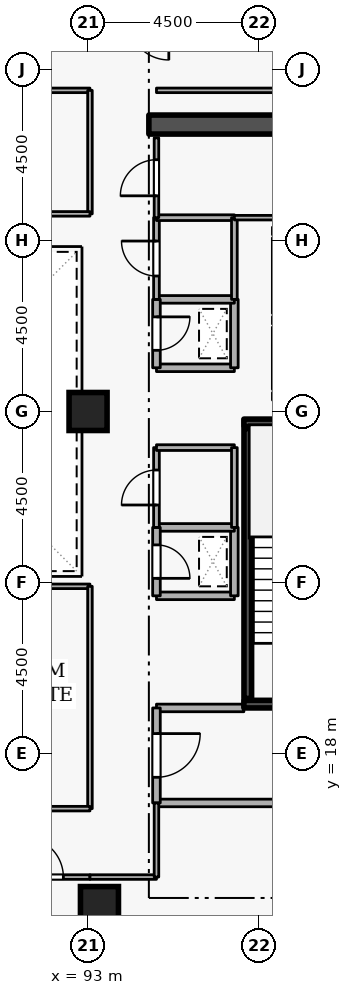
"""IFC4 building model, lengths in metres.
Left out: names, types, materials, properties, quantities, classifications, styles, units other than length and angle.
Written with IfcOpenShell. Run it as: python <this file> out.ifc"""

import sys

from ifc_helpers import new_model, si_unit, direction, frame, frame_2d, origin, origin_2d, place, context, subcontext, project, spatial, rectangle, extrude, element, fill, save


model = new_model("IFC4")
c1 = context("Model", 3, precision=1e-05, world=origin(), true_north=direction((0.0, 1.0)))
c2 = subcontext(c1, "Body", "Model", "MODEL_VIEW")
j1 = project(units=[si_unit("LENGTHUNIT", "METRE"), si_unit("PLANEANGLEUNIT", "RADIAN")], contexts=[c1])
p1 = place(None, origin())
s1 = spatial("IfcSite", under=j1, at=p1, CompositionType="ELEMENT")
p2 = place(p1, origin())
s2 = spatial("IfcBuilding", under=s1, at=p2, CompositionType="ELEMENT")
p3 = place(p2, frame((0.0, 0.0, 229.5)))
s3 = spatial("IfcBuildingStorey", under=s2, at=p3, CompositionType="ELEMENT", Elevation=229.5)
p4 = place(p3, frame((94.6, 34.55, 0.0), z_axis=(0.0, 0.0, 1.0), x_axis=(1.0, 0.0, 0.0)))
e1 = element("IfcWall", 1, at=p4, inside=s3, PredefinedType="SHEAR", context=c2, shape_type="SweptSolid", body=[
    extrude(rectangle(XDim=5.8, YDim=0.5, at=frame_2d((2.9, 0.0))), origin(), (0.0, 0.0, 1.0), 3.6),
])
for number, where, z_axis, x_axis in (
    (2, (93.3, 14.0, 0.0), (0.0, 0.0, 1.0), (1.0, 0.0, 0.0)),
    (3, (93.0, 27.0, 0.0), (0.0, 0.0, 1.0), (1.0, 0.0, 0.0)),
):
    element("IfcColumn", number, at=place(p3, frame(where, z_axis=z_axis, x_axis=x_axis)), inside=s3, PredefinedType="COLUMN", context=c2, shape_type="SweptSolid", body=[
        extrude(rectangle(XDim=1.0, YDim=1.0, at=origin_2d()), origin(), (0.0, 0.0, 1.0), 3.6),
    ])
p5 = place(p3, frame((97.95, 29.22, 0.0), z_axis=(0.0, 0.0, 1.0), x_axis=(0.0, -1.0, 0.0)))
e4 = element("IfcWall", 4, at=p5, inside=s3, PredefinedType="STANDARD", context=c2, shape_type="SweptSolid", body=[
    extrude(rectangle(XDim=1.64, YDim=0.2, at=frame_2d((0.82, 0.0))), origin(), (0.0, 0.0, 1.0), 3.3),
])
p6 = place(p5, frame((0.31, 0.0, 0.0)))
e5 = element("IfcOpeningElement", 5, at=p6, cuts=e4, PredefinedType="OPENING", context=c2, shape_type="SweptSolid", body=[
    extrude(rectangle(XDim=1.02, YDim=2.06, at=frame_2d((0.51, 1.03))), frame((0.0, 0.11, 0.0), z_axis=(0.0, -1.0, 0.0), x_axis=(1.0, 0.0, 0.0)), (0.0, 0.0, 1.0), 0.22),
])
p7 = place(p3, frame((97.95, 31.57, 0.0), z_axis=(0.0, 0.0, 1.0), x_axis=(0.0, -1.0, 0.0)))
e6 = element("IfcWall", 6, at=p7, inside=s3, PredefinedType="STANDARD", context=c2, shape_type="SweptSolid", body=[
    extrude(rectangle(XDim=1.99, YDim=0.2, at=frame_2d((0.995, 0.0))), origin(), (0.0, 0.0, 1.0), 3.3),
])
p8 = place(p7, frame((0.485, 0.0, 0.0)))
e7 = element("IfcOpeningElement", 7, at=p8, cuts=e6, PredefinedType="OPENING", context=c2, shape_type="SweptSolid", body=[
    extrude(rectangle(XDim=1.02, YDim=2.06, at=frame_2d((0.51, 1.03))), frame((0.0, 0.11, 0.0), z_axis=(0.0, -1.0, 0.0), x_axis=(1.0, 0.0, 0.0)), (0.0, 0.0, 1.0), 0.22),
])
p9 = place(p3, frame((100.45, 19.3, 0.0), z_axis=(0.0, 0.0, 1.0), x_axis=(-1.0, 0.0, 0.0)))
e8 = element("IfcWall", 8, at=p9, inside=s3, PredefinedType="SHEAR", context=c2, shape_type="SweptSolid", body=[
    extrude(rectangle(XDim=3.35, YDim=0.2, at=frame_2d((1.675, 0.0))), origin(), (0.0, 0.0, 1.0), 3.6),
])
p10 = place(p9, frame((1.125, 0.0, 0.0)))
e9 = element("IfcOpeningElement", 9, at=p10, cuts=e8, PredefinedType="OPENING", context=c2, shape_type="SweptSolid", body=[
    extrude(rectangle(XDim=1.1, YDim=2.1, at=frame_2d((0.55, 1.05))), frame((0.0, 0.11, 0.0), z_axis=(0.0, -1.0, 0.0), x_axis=(1.0, 0.0, 0.0)), (0.0, 0.0, 1.0), 0.22),
])
p11 = place(p3, frame((97.1, 26.7, 0.0), z_axis=(0.0, 0.0, 1.0), x_axis=(1.0, 0.0, 0.0)))
e10 = element("IfcWall", 10, at=p11, inside=s3, PredefinedType="SHEAR", context=c2, shape_type="SweptSolid", body=[
    extrude(rectangle(XDim=3.35, YDim=0.2, at=frame_2d((1.675, 0.0))), origin(), (0.0, 0.0, 1.0), 3.6),
])
p12 = place(p3, frame((97.203, 26.55, 0.0), z_axis=(0.0, 0.0, 1.0), x_axis=(0.0, -1.0, 0.0)))
e11 = element("IfcWall", 11, at=p12, inside=s3, PredefinedType="SHEAR", context=c2, shape_type="SweptSolid", body=[
    extrude(rectangle(XDim=7.1, YDim=0.2, at=frame_2d((3.55, 0.0))), origin(), (0.0, 0.0, 1.0), 3.6),
])
p13 = place(p3, frame((94.8, 16.7, 0.0), z_axis=(0.0, 0.0, 1.0), x_axis=(1.0, 0.0, 0.0)))
e12 = element("IfcWall", 12, at=p13, inside=s3, PredefinedType="STANDARD", context=c2, shape_type="SweptSolid", body=[
    extrude(rectangle(XDim=5.7, YDim=0.2, at=frame_2d((2.85, 0.0))), origin(), (0.0, 0.0, 1.0), 3.3),
])
p14 = place(p3, frame((97.1, 19.2, 0.0), z_axis=(0.0, 0.0, 1.0), x_axis=(-1.0, 0.0, 0.0)))
e13 = element("IfcWall", 13, at=p14, inside=s3, PredefinedType="STANDARD", context=c2, shape_type="SweptSolid", body=[
    extrude(rectangle(XDim=2.3, YDim=0.2, at=frame_2d((1.15, 0.0))), origin(), (0.0, 0.0, 1.0), 2.505),
])
p15 = place(p3, frame((94.8, 19.2, 0.0), z_axis=(0.0, 0.0, 1.0), x_axis=(0.0, -1.0, 0.0)))
e14 = element("IfcWall", 14, at=p15, inside=s3, PredefinedType="STANDARD", context=c2, shape_type="SweptSolid", body=[
    extrude(rectangle(XDim=2.5, YDim=0.2, at=frame_2d((1.25, 0.0))), origin(), (0.0, 0.0, 1.0), 3.3),
])
p16 = place(p15, frame((0.675, 0.0, 0.0)))
e15 = element("IfcOpeningElement", 15, at=p16, cuts=e14, PredefinedType="OPENING", context=c2, shape_type="SweptSolid", body=[
    extrude(rectangle(XDim=1.15, YDim=2.1, at=frame_2d((0.575, 1.05))), frame((0.0, 0.11, 0.0), z_axis=(0.0, -1.0, 0.0), x_axis=(1.0, 0.0, 0.0)), (0.0, 0.0, 1.0), 0.22),
])
p17 = place(p3, frame((94.8, 28.15, 0.0), z_axis=(0.0, 0.0, 1.0), x_axis=(1.0, 0.0, 0.0)))
e16 = element("IfcWall", 16, at=p17, inside=s3, PredefinedType="STANDARD", context=c2, shape_type="SweptSolid", body=[
    extrude(rectangle(XDim=2.05, YDim=0.2, at=frame_2d((1.025, 0.0))), origin(), (0.0, 0.0, 1.0), 3.3),
])
p18 = place(p3, frame((96.85, 28.15, 0.0), z_axis=(0.0, 0.0, 1.0), x_axis=(0.0, 1.0, 0.0)))
e17 = element("IfcWall", 17, at=p18, inside=s3, PredefinedType="STANDARD", context=c2, shape_type="SweptSolid", body=[
    extrude(rectangle(XDim=1.8, YDim=0.2, at=frame_2d((0.9, 0.0))), origin(), (0.0, 0.0, 1.0), 3.3),
])
p19 = place(p3, frame((96.85, 29.95, 0.0), z_axis=(0.0, 0.0, 1.0), x_axis=(-1.0, 0.0, 0.0)))
e18 = element("IfcWall", 18, at=p19, inside=s3, PredefinedType="STANDARD", context=c2, shape_type="SweptSolid", body=[
    extrude(rectangle(XDim=2.05, YDim=0.2, at=frame_2d((1.025, 0.0))), origin(), (0.0, 0.0, 1.0), 3.3),
])
p20 = place(p3, frame((94.8, 29.95, 0.0), z_axis=(0.0, 0.0, 1.0), x_axis=(0.0, -1.0, 0.0)))
e19 = element("IfcWall", 19, at=p20, inside=s3, PredefinedType="STANDARD", context=c2, shape_type="SweptSolid", body=[
    extrude(rectangle(XDim=1.8, YDim=0.2, at=frame_2d((0.9, 0.0))), origin(), (0.0, 0.0, 1.0), 3.3),
])
p21 = place(p20, frame((0.46, 0.0, 0.0)))
e20 = element("IfcOpeningElement", 20, at=p21, cuts=e19, PredefinedType="OPENING", context=c2, shape_type="SweptSolid", body=[
    extrude(rectangle(XDim=0.88, YDim=2.04, at=frame_2d((0.44, 1.02))), frame((0.0, 0.11, 0.0), z_axis=(0.0, -1.0, 0.0), x_axis=(1.0, 0.0, 0.0)), (0.0, 0.0, 1.0), 0.22),
])
p22 = place(p3, frame((94.8, 22.15, 0.0), z_axis=(0.0, 0.0, 1.0), x_axis=(1.0, 0.0, 0.0)))
e21 = element("IfcWall", 21, at=p22, inside=s3, PredefinedType="STANDARD", context=c2, shape_type="SweptSolid", body=[
    extrude(rectangle(XDim=2.05, YDim=0.2, at=frame_2d((1.025, 0.0))), origin(), (0.0, 0.0, 1.0), 3.3),
])
p23 = place(p3, frame((96.85, 22.15, 0.0), z_axis=(0.0, 0.0, 1.0), x_axis=(0.0, 1.0, 0.0)))
e22 = element("IfcWall", 22, at=p23, inside=s3, PredefinedType="STANDARD", context=c2, shape_type="SweptSolid", body=[
    extrude(rectangle(XDim=1.8, YDim=0.2, at=frame_2d((0.9, 0.0))), origin(), (0.0, 0.0, 1.0), 3.3),
])
p24 = place(p3, frame((96.85, 23.95, 0.0), z_axis=(0.0, 0.0, 1.0), x_axis=(-1.0, 0.0, 0.0)))
e23 = element("IfcWall", 23, at=p24, inside=s3, PredefinedType="STANDARD", context=c2, shape_type="SweptSolid", body=[
    extrude(rectangle(XDim=2.05, YDim=0.2, at=frame_2d((1.025, 0.0))), origin(), (0.0, 0.0, 1.0), 3.3),
])
p25 = place(p3, frame((94.8, 23.95, 0.0), z_axis=(0.0, 0.0, 1.0), x_axis=(0.0, -1.0, 0.0)))
e24 = element("IfcWall", 24, at=p25, inside=s3, PredefinedType="STANDARD", context=c2, shape_type="SweptSolid", body=[
    extrude(rectangle(XDim=1.8, YDim=0.2, at=frame_2d((0.9, 0.0))), origin(), (0.0, 0.0, 1.0), 3.3),
])
p26 = place(p25, frame((0.46, 0.0, 0.0)))
e25 = element("IfcOpeningElement", 25, at=p26, cuts=e24, PredefinedType="OPENING", context=c2, shape_type="SweptSolid", body=[
    extrude(rectangle(XDim=0.88, YDim=2.04, at=frame_2d((0.44, 1.02))), frame((0.0, 0.11, 0.0), z_axis=(0.0, -1.0, 0.0), x_axis=(1.0, 0.0, 0.0)), (0.0, 0.0, 1.0), 0.22),
])
p27 = place(p3, frame((94.8, 23.95, 0.0), z_axis=(0.0, 0.0, 1.0), x_axis=(0.0, 1.0, 0.0)))
e26 = element("IfcWall", 26, at=p27, inside=s3, PredefinedType="PARTITIONING", context=c2, shape_type="SweptSolid", body=[
    extrude(rectangle(XDim=2.1, YDim=0.15, at=frame_2d((1.05, 0.0))), origin(), (0.0, 0.0, 1.0), 3.3),
])
p28 = place(p27, frame((0.59, 0.0, 0.0)))
e27 = element("IfcOpeningElement", 27, at=p28, cuts=e26, PredefinedType="OPENING", context=c2, shape_type="SweptSolid", body=[
    extrude(rectangle(XDim=0.92, YDim=2.08, at=frame_2d((0.46, 1.04))), frame((0.0, 0.085, 0.0), z_axis=(0.0, -1.0, 0.0), x_axis=(1.0, 0.0, 0.0)), (0.0, 0.0, 1.0), 0.17),
])
p29 = place(p3, frame((94.8, 26.05, 0.0), z_axis=(0.0, 0.0, 1.0), x_axis=(1.0, 0.0, 0.0)))
e28 = element("IfcWall", 28, at=p29, inside=s3, PredefinedType="PARTITIONING", context=c2, shape_type="SweptSolid", body=[
    extrude(rectangle(XDim=2.05, YDim=0.15, at=frame_2d((1.025, 0.0))), origin(), (0.0, 0.0, 1.0), 3.3),
])
p30 = place(p3, frame((96.85, 26.05, 0.0), z_axis=(0.0, 0.0, 1.0), x_axis=(0.0, -1.0, 0.0)))
e29 = element("IfcWall", 29, at=p30, inside=s3, PredefinedType="PARTITIONING", context=c2, shape_type="SweptSolid", body=[
    extrude(rectangle(XDim=2.1, YDim=0.15, at=frame_2d((1.05, 0.0))), origin(), (0.0, 0.0, 1.0), 3.3),
])
p31 = place(p3, frame((94.8, 29.95, 0.0), z_axis=(0.0, 0.0, 1.0), x_axis=(0.0, 1.0, 0.0)))
e30 = element("IfcWall", 30, at=p31, inside=s3, PredefinedType="PARTITIONING", context=c2, shape_type="SweptSolid", body=[
    extrude(rectangle(XDim=2.15, YDim=0.15, at=frame_2d((1.075, 0.0))), origin(), (0.0, 0.0, 1.0), 3.3),
])
p32 = place(p31, frame((0.615, 0.0, 0.0)))
e31 = element("IfcOpeningElement", 31, at=p32, cuts=e30, PredefinedType="OPENING", context=c2, shape_type="SweptSolid", body=[
    extrude(rectangle(XDim=0.92, YDim=2.08, at=frame_2d((0.46, 1.04))), frame((0.0, 0.085, 0.0), z_axis=(0.0, -1.0, 0.0), x_axis=(1.0, 0.0, 0.0)), (0.0, 0.0, 1.0), 0.17),
])
p33 = place(p3, frame((94.8, 32.1, 0.0), z_axis=(0.0, 0.0, 1.0), x_axis=(1.0, 0.0, 0.0)))
e32 = element("IfcWall", 32, at=p33, inside=s3, PredefinedType="PARTITIONING", context=c2, shape_type="SweptSolid", body=[
    extrude(rectangle(XDim=2.05, YDim=0.15, at=frame_2d((1.025, 0.0))), origin(), (0.0, 0.0, 1.0), 3.3),
])
p34 = place(p3, frame((96.85, 32.1, 0.0), z_axis=(0.0, 0.0, 1.0), x_axis=(0.0, -1.0, 0.0)))
e33 = element("IfcWall", 33, at=p34, inside=s3, PredefinedType="PARTITIONING", context=c2, shape_type="SweptSolid", body=[
    extrude(rectangle(XDim=2.15, YDim=0.15, at=frame_2d((1.075, 0.0))), origin(), (0.0, 0.0, 1.0), 3.3),
])
p35 = place(p3, frame((94.8, 32.1, 0.0), z_axis=(0.0, 0.0, 1.0), x_axis=(0.0, 1.0, 0.0)))
e34 = element("IfcWall", 34, at=p35, inside=s3, PredefinedType="PARTITIONING", context=c2, shape_type="SweptSolid", body=[
    extrude(rectangle(XDim=2.1, YDim=0.12, at=frame_2d((1.05, 0.0))), origin(), (0.0, 0.0, 1.0), 3.3),
])
p36 = place(p35, frame((0.575, 0.0, 0.0)))
e35 = element("IfcOpeningElement", 35, at=p36, cuts=e34, PredefinedType="OPENING", context=c2, shape_type="SweptSolid", body=[
    extrude(rectangle(XDim=0.95, YDim=2.1, at=frame_2d((0.475, 1.05))), frame((0.0, 0.07, 0.0), z_axis=(0.0, -1.0, 0.0), x_axis=(1.0, 0.0, 0.0)), (0.0, 0.0, 1.0), 0.14),
])
p37 = place(p3, frame((100.4, 32.1, 0.0), z_axis=(0.0, 0.0, 1.0), x_axis=(-1.0, 0.0, 0.0)))
e36 = element("IfcWall", 36, at=p37, inside=s3, PredefinedType="PARTITIONING", context=c2, shape_type="SweptSolid", body=[
    extrude(rectangle(XDim=3.55, YDim=0.12, at=frame_2d((1.775, 0.0))), origin(), (0.0, 0.0, 1.0), 3.3),
])
p38 = place(p3, frame((94.8, 35.45, 0.0), z_axis=(0.0, 0.0, 1.0), x_axis=(1.0, 0.0, 0.0)))
e37 = element("IfcWall", 37, at=p38, inside=s3, PredefinedType="PARTITIONING", context=c2, shape_type="SweptSolid", body=[
    extrude(rectangle(XDim=5.9, YDim=0.12, at=frame_2d((2.95, 0.0))), origin(), (0.0, 0.0, 1.0), 3.3),
])
p39 = place(p3, frame((90.6, 14.75, 0.0), z_axis=(0.0, 0.0, 1.0), x_axis=(1.0, 0.0, 0.0)))
e38 = element("IfcWall", 38, at=p39, inside=s3, PredefinedType="PARTITIONING", context=c2, shape_type="SweptSolid", body=[
    extrude(rectangle(XDim=2.45, YDim=0.12, at=frame_2d((1.225, 0.0))), origin(), (0.0, 0.0, 1.0), 3.3),
])
p40 = place(p39, frame((0.7, 0.0, 0.0)))
e39 = element("IfcOpeningElement", 39, at=p40, cuts=e38, PredefinedType="OPENING", context=c2, shape_type="SweptSolid", body=[
    extrude(rectangle(XDim=1.05, YDim=2.1, at=frame_2d((0.525, 1.05))), frame((0.0, 0.07, 0.0), z_axis=(0.0, -1.0, 0.0), x_axis=(1.0, 0.0, 0.0)), (0.0, 0.0, 1.0), 0.14),
])
p41 = place(p3, frame((93.05, 14.75, 0.0), z_axis=(0.0, 0.0, 1.0), x_axis=(1.0, 0.0, 0.0)))
e40 = element("IfcWall", 40, at=p41, inside=s3, PredefinedType="PARTITIONING", context=c2, shape_type="SweptSolid", body=[
    extrude(rectangle(XDim=1.75, YDim=0.12, at=frame_2d((0.875, 0.0))), origin(), (0.0, 0.0, 1.0), 3.3),
])
p42 = place(p3, frame((94.8, 14.75, 0.0), z_axis=(0.0, 0.0, 1.0), x_axis=(0.0, 1.0, 0.0)))
e41 = element("IfcWall", 41, at=p42, inside=s3, PredefinedType="PARTITIONING", context=c2, shape_type="SweptSolid", body=[
    extrude(rectangle(XDim=1.95, YDim=0.12, at=frame_2d((0.975, 0.0))), origin(), (0.0, 0.0, 1.0), 3.3),
])
p43 = place(p3, frame((83.95, 22.4, 0.0), z_axis=(0.0, 0.0, 1.0), x_axis=(1.0, 0.0, 0.0)))
e42 = element("IfcWall", 42, at=p43, inside=s3, PredefinedType="PARTITIONING", context=c2, shape_type="SweptSolid", body=[
    extrude(rectangle(XDim=9.1, YDim=0.12, at=frame_2d((4.55, 0.0))), origin(), (0.0, 0.0, 1.0), 3.3),
])
p44 = place(p3, frame((93.05, 22.4, 0.0), z_axis=(0.0, 0.0, 1.0), x_axis=(0.0, -1.0, 0.0)))
e43 = element("IfcWall", 43, at=p44, inside=s3, PredefinedType="PARTITIONING", context=c2, shape_type="SweptSolid", body=[
    extrude(rectangle(XDim=5.85, YDim=0.12, at=frame_2d((2.925, 0.0))), origin(), (0.0, 0.0, 1.0), 3.3),
])
p45 = place(p3, frame((93.05, 16.55, 0.0), z_axis=(0.0, 0.0, 1.0), x_axis=(-1.0, 0.0, 0.0)))
e44 = element("IfcWall", 44, at=p45, inside=s3, PredefinedType="PARTITIONING", context=c2, shape_type="SweptSolid", body=[
    extrude(rectangle(XDim=9.1, YDim=0.12, at=frame_2d((4.55, 0.0))), origin(), (0.0, 0.0, 1.0), 3.3),
])
p46 = place(p45, frame((4.075, 0.0, 0.0)))
e45 = element("IfcOpeningElement", 45, at=p46, cuts=e44, PredefinedType="OPENING", context=c2, shape_type="SweptSolid", body=[
    extrude(rectangle(XDim=0.95, YDim=2.1, at=frame_2d((0.475, 1.05))), frame((0.0, 0.07, 0.0), z_axis=(0.0, -1.0, 0.0), x_axis=(1.0, 0.0, 0.0)), (0.0, 0.0, 1.0), 0.14),
])
p47 = place(p3, frame((83.95, 35.45, 0.0), z_axis=(0.0, 0.0, 1.0), x_axis=(1.0, 0.0, 0.0)))
e46 = element("IfcWall", 46, at=p47, inside=s3, PredefinedType="PARTITIONING", context=c2, shape_type="SweptSolid", body=[
    extrude(rectangle(XDim=9.1, YDim=0.12, at=frame_2d((4.55, 0.0))), origin(), (0.0, 0.0, 1.0), 3.3),
])
p48 = place(p47, frame((4.075, 0.0, 0.0)))
e47 = element("IfcOpeningElement", 47, at=p48, cuts=e46, PredefinedType="OPENING", context=c2, shape_type="SweptSolid", body=[
    extrude(rectangle(XDim=0.95, YDim=2.1, at=frame_2d((0.475, 1.05))), frame((0.0, 0.07, 0.0), z_axis=(0.0, -1.0, 0.0), x_axis=(1.0, 0.0, 0.0)), (0.0, 0.0, 1.0), 0.14),
])
p49 = place(p3, frame((93.05, 35.45, 0.0), z_axis=(0.0, 0.0, 1.0), x_axis=(0.0, -1.0, 0.0)))
e48 = element("IfcWall", 48, at=p49, inside=s3, PredefinedType="PARTITIONING", context=c2, shape_type="SweptSolid", body=[
    extrude(rectangle(XDim=3.25, YDim=0.12, at=frame_2d((1.625, 0.0))), origin(), (0.0, 0.0, 1.0), 3.3),
])
p50 = place(p3, frame((93.05, 32.2, 0.0), z_axis=(0.0, 0.0, 1.0), x_axis=(-1.0, 0.0, 0.0)))
e49 = element("IfcWall", 49, at=p50, inside=s3, PredefinedType="PARTITIONING", context=c2, shape_type="SweptSolid", body=[
    extrude(rectangle(XDim=9.1, YDim=0.12, at=frame_2d((4.55, 0.0))), origin(), (0.0, 0.0, 1.0), 3.3),
])
p51 = place(p16, origin())
e50 = element("IfcDoor", 50, at=p51, inside=s3, OperationType="SINGLE_SWING_LEFT", PredefinedType="DOOR", context=c2, shape_type="SweptSolid", body=[
    extrude(rectangle(XDim=1.15, YDim=2.1, at=frame_2d((0.575, 1.05))), frame((0.0, 0.025, 0.0), z_axis=(0.0, -1.0, 0.0), x_axis=(1.0, 0.0, 0.0)), (0.0, 0.0, 1.0), 0.05),
])
fill(e15, e50)
p52 = place(p21, origin())
e51 = element("IfcDoor", 51, at=p52, inside=s3, OperationType="SINGLE_SWING_LEFT", PredefinedType="DOOR", context=c2, shape_type="SweptSolid", body=[
    extrude(rectangle(XDim=0.88, YDim=2.04, at=frame_2d((0.44, 1.02))), frame((0.0, 0.025, 0.0), z_axis=(0.0, -1.0, 0.0), x_axis=(1.0, 0.0, 0.0)), (0.0, 0.0, 1.0), 0.05),
])
fill(e20, e51)
p53 = place(p26, origin())
e52 = element("IfcDoor", 52, at=p53, inside=s3, OperationType="SINGLE_SWING_RIGHT", PredefinedType="DOOR", context=c2, shape_type="SweptSolid", body=[
    extrude(rectangle(XDim=0.88, YDim=2.04, at=frame_2d((0.44, 1.02))), frame((0.0, 0.025, 0.0), z_axis=(0.0, -1.0, 0.0), x_axis=(1.0, 0.0, 0.0)), (0.0, 0.0, 1.0), 0.05),
])
fill(e25, e52)
p54 = place(p28, origin())
e53 = element("IfcDoor", 53, at=p54, inside=s3, OperationType="SINGLE_SWING_LEFT", PredefinedType="DOOR", context=c2, shape_type="SweptSolid", body=[
    extrude(rectangle(XDim=0.92, YDim=2.08, at=frame_2d((0.46, 1.04))), frame((0.0, 0.025, 0.0), z_axis=(0.0, -1.0, 0.0), x_axis=(1.0, 0.0, 0.0)), (0.0, 0.0, 1.0), 0.05),
])
fill(e27, e53)
p55 = place(p32, origin())
e54 = element("IfcDoor", 54, at=p55, inside=s3, OperationType="SINGLE_SWING_RIGHT", PredefinedType="DOOR", context=c2, shape_type="SweptSolid", body=[
    extrude(rectangle(XDim=0.92, YDim=2.08, at=frame_2d((0.46, 1.04))), frame((0.0, 0.025, 0.0), z_axis=(0.0, -1.0, 0.0), x_axis=(1.0, 0.0, 0.0)), (0.0, 0.0, 1.0), 0.05),
])
fill(e31, e54)
p56 = place(p36, origin())
e55 = element("IfcDoor", 55, at=p56, inside=s3, OperationType="SINGLE_SWING_LEFT", PredefinedType="DOOR", context=c2, shape_type="SweptSolid", body=[
    extrude(rectangle(XDim=0.95, YDim=2.1, at=frame_2d((0.475, 1.05))), frame((0.0, 0.025, 0.0), z_axis=(0.0, -1.0, 0.0), x_axis=(1.0, 0.0, 0.0)), (0.0, 0.0, 1.0), 0.05),
])
fill(e35, e55)
p57 = place(p40, origin())
e56 = element("IfcDoor", 56, at=p57, inside=s3, OperationType="SINGLE_SWING_LEFT", PredefinedType="DOOR", context=c2, shape_type="SweptSolid", body=[
    extrude(rectangle(XDim=1.05, YDim=2.1, at=frame_2d((0.525, 1.05))), frame((0.0, 0.025, 0.0), z_axis=(0.0, -1.0, 0.0), x_axis=(1.0, 0.0, 0.0)), (0.0, 0.0, 1.0), 0.05),
])
fill(e39, e56)
save(model, sys.argv[1])
